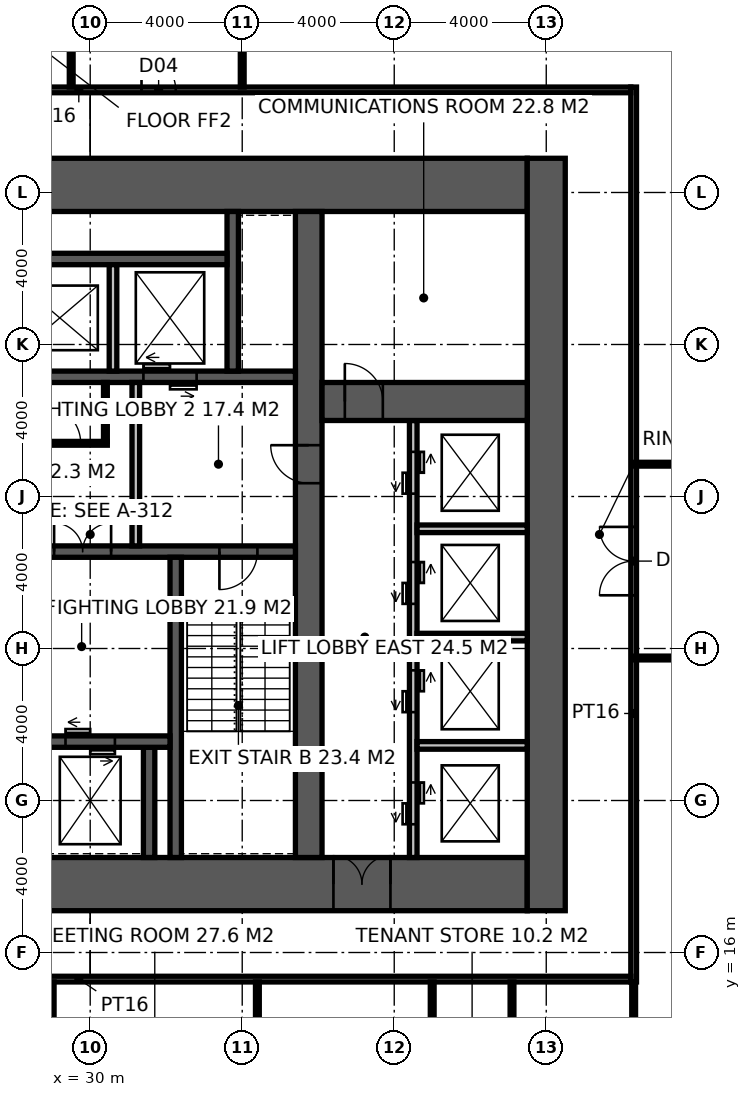
"""IFC4 building model, lengths in metres.
Left out: names, types, materials, properties, quantities, classifications, styles, units other than length and angle.
Written with IfcOpenShell. Run it as: python <this file> out.ifc"""

import sys

from ifc_helpers import new_model, si_unit, direction, frame, frame_2d, origin, place, context, subcontext, project, spatial, rectangle, extrude, element, fill, save


model = new_model("IFC4")
c1 = context("Model", 3, precision=1e-05, world=origin(), true_north=direction((0.0, 1.0)))
c2 = subcontext(c1, "Body", "Model", "MODEL_VIEW")
j1 = project(units=[si_unit("LENGTHUNIT", "METRE"), si_unit("PLANEANGLEUNIT", "RADIAN")], contexts=[c1])
p1 = place(None, origin())
s1 = spatial("IfcSite", under=j1, at=p1, CompositionType="ELEMENT")
p2 = place(p1, origin())
s2 = spatial("IfcBuilding", under=s1, at=p2, CompositionType="ELEMENT")
p3 = place(p2, frame((0.0, 0.0, 27.0)))
s3 = spatial("IfcBuildingStorey", under=s2, at=p3, CompositionType="ELEMENT", Elevation=27.0)
p4 = place(p3, frame((18.5, 17.8, -0.15), z_axis=(0.0, 0.0, 1.0), x_axis=(1.0, 0.0, 0.0)))
e1 = element("IfcWall", 1, at=p4, inside=s3, PredefinedType="SHEAR", context=c2, shape_type="SweptSolid", body=[
    extrude(rectangle(XDim=23.0, YDim=1.4, at=frame_2d((11.5, 0.0))), origin(), (0.0, 0.0, 1.0), 4.0),
])
p5 = place(p4, frame((3.45, 0.0, 0.15)))
e2 = element("IfcOpeningElement", 2, at=p5, cuts=e1, PredefinedType="OPENING", context=c2, shape_type="SweptSolid", body=[
    extrude(rectangle(XDim=1.5, YDim=2.4, at=frame_2d((0.75, 1.2))), frame((0.0, 0.71, 0.0), z_axis=(0.0, -1.0, 0.0), x_axis=(1.0, 0.0, 0.0)), (0.0, 0.0, 1.0), 1.42),
])
p6 = place(p4, frame((17.9, 0.0, 0.15)))
e3 = element("IfcOpeningElement", 3, at=p6, cuts=e1, PredefinedType="OPENING", context=c2, shape_type="SweptSolid", body=[
    extrude(rectangle(XDim=1.5, YDim=2.4, at=frame_2d((0.75, 1.2))), frame((0.0, 0.71, 0.0), z_axis=(0.0, -1.0, 0.0), x_axis=(1.0, 0.0, 0.0)), (0.0, 0.0, 1.0), 1.42),
])
p7 = place(p4, frame((0.9, 0.0, 0.15)))
e4 = element("IfcOpeningElement", 4, at=p7, cuts=e1, PredefinedType="OPENING", context=c2, shape_type="SweptSolid", body=[
    extrude(rectangle(XDim=1.0, YDim=2.2, at=frame_2d((0.5, 1.1))), frame((0.0, 0.71, 0.0), z_axis=(0.0, -1.0, 0.0), x_axis=(1.0, 0.0, 0.0)), (0.0, 0.0, 1.0), 1.42),
])
p8 = place(p3, frame((18.5, 36.2, -0.15), z_axis=(0.0, 0.0, 1.0), x_axis=(1.0, 0.0, 0.0)))
e5 = element("IfcWall", 5, at=p8, inside=s3, PredefinedType="SHEAR", context=c2, shape_type="SweptSolid", body=[
    extrude(rectangle(XDim=23.0, YDim=1.4, at=frame_2d((11.5, 0.0))), origin(), (0.0, 0.0, 1.0), 4.0),
])
p9 = place(p3, frame((42.0, 17.1, -0.15), z_axis=(0.0, 0.0, 1.0), x_axis=(0.0, 1.0, 0.0)))
e6 = element("IfcWall", 6, at=p9, inside=s3, PredefinedType="SHEAR", context=c2, shape_type="SweptSolid", body=[
    extrude(rectangle(XDim=19.8, YDim=1.0, at=frame_2d((9.9, 0.0))), origin(), (0.0, 0.0, 1.0), 4.0),
])
p10 = place(p3, frame((35.75, 18.5, -0.15), z_axis=(0.0, 0.0, 1.0), x_axis=(0.0, 1.0, 0.0)))
e7 = element("IfcWall", 7, at=p10, inside=s3, PredefinedType="SHEAR", context=c2, shape_type="SweptSolid", body=[
    extrude(rectangle(XDim=17.0, YDim=0.7, at=frame_2d((8.5, 0.0))), origin(), (0.0, 0.0, 1.0), 4.0),
])
p11 = place(p10, frame((9.85, 0.0, 0.15)))
e8 = element("IfcOpeningElement", 8, at=p11, cuts=e7, PredefinedType="OPENING", context=c2, shape_type="SweptSolid", body=[
    extrude(rectangle(XDim=1.0, YDim=2.2, at=frame_2d((0.5, 1.1))), frame((0.0, 0.36, 0.0), z_axis=(0.0, -1.0, 0.0), x_axis=(1.0, 0.0, 0.0)), (0.0, 0.0, 1.0), 0.72),
])
p12 = place(p3, frame((24.15, 26.55, -0.15), z_axis=(0.0, 0.0, 1.0), x_axis=(1.0, 0.0, 0.0)))
e9 = element("IfcWall", 9, at=p12, inside=s3, PredefinedType="SHEAR", context=c2, shape_type="SweptSolid", body=[
    extrude(rectangle(XDim=11.25, YDim=0.3, at=frame_2d((5.625, 0.0))), origin(), (0.0, 0.0, 1.0), 4.0),
])
p13 = place(p12, frame((9.25, 0.0, 0.15)))
e10 = element("IfcOpeningElement", 10, at=p13, cuts=e9, PredefinedType="OPENING", context=c2, shape_type="SweptSolid", body=[
    extrude(rectangle(XDim=1.0, YDim=2.2, at=frame_2d((0.5, 1.1))), frame((0.0, 0.16, 0.0), z_axis=(0.0, -1.0, 0.0), x_axis=(1.0, 0.0, 0.0)), (0.0, 0.0, 1.0), 0.32),
])
p14 = place(p12, frame((4.9, 0.0, 0.15)))
e11 = element("IfcOpeningElement", 11, at=p14, cuts=e9, PredefinedType="OPENING", context=c2, shape_type="SweptSolid", body=[
    extrude(rectangle(XDim=1.5, YDim=2.4, at=frame_2d((0.75, 1.2))), frame((0.0, 0.16, 0.0), z_axis=(0.0, -1.0, 0.0), x_axis=(1.0, 0.0, 0.0)), (0.0, 0.0, 1.0), 0.32),
])
p15 = place(p3, frame((32.25, 18.5, -0.15), z_axis=(0.0, 0.0, 1.0), x_axis=(0.0, 1.0, 0.0)))
e12 = element("IfcWall", 12, at=p15, inside=s3, PredefinedType="SHEAR", context=c2, shape_type="SweptSolid", body=[
    extrude(rectangle(XDim=7.9, YDim=0.3, at=frame_2d((3.95, 0.0))), origin(), (0.0, 0.0, 1.0), 4.0),
])
p16 = place(p3, frame((31.55, 18.5, -0.15), z_axis=(0.0, 0.0, 1.0), x_axis=(0.0, 1.0, 0.0)))
e13 = element("IfcWall", 13, at=p16, inside=s3, PredefinedType="SHEAR", context=c2, shape_type="SweptSolid", body=[
    extrude(rectangle(XDim=2.9, YDim=0.3, at=frame_2d((1.45, 0.0))), origin(), (0.0, 0.0, 1.0), 4.0),
])
p17 = place(p3, frame((28.3, 21.55, -0.15), z_axis=(0.0, 0.0, 1.0), x_axis=(1.0, 0.0, 0.0)))
e14 = element("IfcWall", 14, at=p17, inside=s3, PredefinedType="SHEAR", context=c2, shape_type="SweptSolid", body=[
    extrude(rectangle(XDim=3.8, YDim=0.3, at=frame_2d((1.9, 0.0))), origin(), (0.0, 0.0, 1.0), 4.0),
])
p18 = place(p17, frame((1.05, 0.0, 0.15)))
e15 = element("IfcOpeningElement", 15, at=p18, cuts=e14, PredefinedType="OPENING", context=c2, shape_type="SweptSolid", body=[
    extrude(rectangle(XDim=1.3, YDim=2.4, at=frame_2d((0.65, 1.2))), frame((0.0, 0.16, 0.0), z_axis=(0.0, -1.0, 0.0), x_axis=(1.0, 0.0, 0.0)), (0.0, 0.0, 1.0), 0.32),
])
p19 = place(p3, frame((24.15, 31.15, -0.15), z_axis=(0.0, 0.0, 1.0), x_axis=(1.0, 0.0, 0.0)))
e16 = element("IfcWall", 16, at=p19, inside=s3, PredefinedType="SHEAR", context=c2, shape_type="SweptSolid", body=[
    extrude(rectangle(XDim=11.25, YDim=0.3, at=frame_2d((5.625, 0.0))), origin(), (0.0, 0.0, 1.0), 4.0),
])
p20 = place(p19, frame((7.25, 0.0, 0.15)))
e17 = element("IfcOpeningElement", 17, at=p20, cuts=e16, PredefinedType="OPENING", context=c2, shape_type="SweptSolid", body=[
    extrude(rectangle(XDim=1.4, YDim=2.4, at=frame_2d((0.7, 1.2))), frame((0.0, 0.16, 0.0), z_axis=(0.0, -1.0, 0.0), x_axis=(1.0, 0.0, 0.0)), (0.0, 0.0, 1.0), 0.32),
])
p21 = place(p3, frame((33.75, 31.3, -0.15), z_axis=(0.0, 0.0, 1.0), x_axis=(0.0, 1.0, 0.0)))
e18 = element("IfcWall", 18, at=p21, inside=s3, PredefinedType="SHEAR", context=c2, shape_type="SweptSolid", body=[
    extrude(rectangle(XDim=4.2, YDim=0.3, at=frame_2d((2.1, 0.0))), origin(), (0.0, 0.0, 1.0), 4.0),
])
p22 = place(p3, frame((25.0, 34.25, -0.15), z_axis=(0.0, 0.0, 1.0), x_axis=(1.0, 0.0, 0.0)))
e19 = element("IfcWall", 19, at=p22, inside=s3, PredefinedType="SHEAR", context=c2, shape_type="SweptSolid", body=[
    extrude(rectangle(XDim=8.6, YDim=0.3, at=frame_2d((4.3, 0.0))), origin(), (0.0, 0.0, 1.0), 4.0),
])
p23 = place(p3, frame((30.6, 31.3, -0.15), z_axis=(0.0, 0.0, 1.0), x_axis=(0.0, 1.0, 0.0)))
e20 = element("IfcWall", 20, at=p23, inside=s3, PredefinedType="SOLIDWALL", context=c2, shape_type="SweptSolid", body=[
    extrude(rectangle(XDim=2.8, YDim=0.2, at=frame_2d((1.4, 0.0))), origin(), (0.0, 0.0, 1.0), 4.0),
])
p24 = place(p3, frame((38.5, 18.5, -0.15), z_axis=(0.0, 0.0, 1.0), x_axis=(0.0, 1.0, 0.0)))
e21 = element("IfcWall", 21, at=p24, inside=s3, PredefinedType="SOLIDWALL", context=c2, shape_type="SweptSolid", body=[
    extrude(rectangle(XDim=11.5, YDim=0.2, at=frame_2d((5.75, 0.0))), origin(), (0.0, 0.0, 1.0), 4.0),
])
p25 = place(p24, frame((0.875, 0.0, 0.15)))
e22 = element("IfcOpeningElement", 22, at=p25, cuts=e21, PredefinedType="OPENING", context=c2, shape_type="SweptSolid", body=[
    extrude(rectangle(XDim=1.1, YDim=2.2, at=frame_2d((0.55, 1.1))), frame((0.0, 0.11, 0.0), z_axis=(0.0, -1.0, 0.0), x_axis=(1.0, 0.0, 0.0)), (0.0, 0.0, 1.0), 0.22),
])
p26 = place(p24, frame((3.825, 0.0, 0.15)))
e23 = element("IfcOpeningElement", 23, at=p26, cuts=e21, PredefinedType="OPENING", context=c2, shape_type="SweptSolid", body=[
    extrude(rectangle(XDim=1.1, YDim=2.2, at=frame_2d((0.55, 1.1))), frame((0.0, 0.11, 0.0), z_axis=(0.0, -1.0, 0.0), x_axis=(1.0, 0.0, 0.0)), (0.0, 0.0, 1.0), 0.22),
])
p27 = place(p24, frame((6.675, 0.0, 0.15)))
e24 = element("IfcOpeningElement", 24, at=p27, cuts=e21, PredefinedType="OPENING", context=c2, shape_type="SweptSolid", body=[
    extrude(rectangle(XDim=1.1, YDim=2.2, at=frame_2d((0.55, 1.1))), frame((0.0, 0.11, 0.0), z_axis=(0.0, -1.0, 0.0), x_axis=(1.0, 0.0, 0.0)), (0.0, 0.0, 1.0), 0.22),
])
p28 = place(p24, frame((9.575, 0.0, 0.15)))
e25 = element("IfcOpeningElement", 25, at=p28, cuts=e21, PredefinedType="OPENING", context=c2, shape_type="SweptSolid", body=[
    extrude(rectangle(XDim=1.1, YDim=2.2, at=frame_2d((0.55, 1.1))), frame((0.0, 0.11, 0.0), z_axis=(0.0, -1.0, 0.0), x_axis=(1.0, 0.0, 0.0)), (0.0, 0.0, 1.0), 0.22),
])
p29 = place(p3, frame((36.1, 30.5, -0.15), z_axis=(0.0, 0.0, 1.0), x_axis=(1.0, 0.0, 0.0)))
e26 = element("IfcWall", 26, at=p29, inside=s3, PredefinedType="SHEAR", context=c2, shape_type="SweptSolid", body=[
    extrude(rectangle(XDim=5.4, YDim=1.0, at=frame_2d((2.7, 0.0))), origin(), (0.0, 0.0, 1.0), 4.0),
])
p30 = place(p29, frame((0.6, 0.0, 0.15)))
e27 = element("IfcOpeningElement", 27, at=p30, cuts=e26, PredefinedType="OPENING", context=c2, shape_type="SweptSolid", body=[
    extrude(rectangle(XDim=1.0, YDim=2.2, at=frame_2d((0.5, 1.1))), frame((0.0, 0.51, 0.0), z_axis=(0.0, -1.0, 0.0), x_axis=(1.0, 0.0, 0.0)), (0.0, 0.0, 1.0), 1.02),
])
for number, where, z_axis, x_axis in (
    (28, (38.6, 21.45, -0.15), (0.0, 0.0, 1.0), (1.0, 0.0, 0.0)),
    (29, (38.6, 24.3, -0.15), (0.0, 0.0, 1.0), (1.0, 0.0, 0.0)),
    (30, (38.6, 27.15, -0.15), (0.0, 0.0, 1.0), (1.0, 0.0, 0.0)),
):
    element("IfcWall", number, at=place(p3, frame(where, z_axis=z_axis, x_axis=x_axis)), inside=s3, PredefinedType="SOLIDWALL", context=c2, shape_type="SweptSolid", body=[
        extrude(rectangle(XDim=2.9, YDim=0.2, at=frame_2d((1.45, 0.0))), origin(), (0.0, 0.0, 1.0), 4.0),
    ])
p31 = place(p3, frame((31.2, 26.7, 0.0), z_axis=(0.0, 0.0, 1.0), x_axis=(0.0, 1.0, 0.0)))
e31 = element("IfcWall", 31, at=p31, inside=s3, PredefinedType="SOLIDWALL", context=c2, shape_type="SweptSolid", body=[
    extrude(rectangle(XDim=4.3, YDim=0.2, at=frame_2d((2.15, 0.0))), origin(), (0.0, 0.0, 1.0), 3.85),
])
p32 = place(p3, frame((25.75, 29.4, 0.0), z_axis=(0.0, 0.0, 1.0), x_axis=(1.0, 0.0, 0.0)))
e32 = element("IfcWall", 32, at=p32, inside=s3, PredefinedType="PARTITIONING", context=c2, shape_type="SweptSolid", body=[
    extrude(rectangle(XDim=4.7, YDim=0.1, at=frame_2d((2.35, 0.0))), origin(), (0.0, 0.0, 1.0), 3.85),
])
p33 = place(p32, frame((0.7, 0.0, 0.0)))
e33 = element("IfcOpeningElement", 33, at=p33, cuts=e32, PredefinedType="OPENING", context=c2, shape_type="SweptSolid", body=[
    extrude(rectangle(XDim=1.0, YDim=2.2, at=frame_2d((0.5, 1.1))), frame((0.0, 0.06, 0.0), z_axis=(0.0, -1.0, 0.0), x_axis=(1.0, 0.0, 0.0)), (0.0, 0.0, 1.0), 0.12),
])
p34 = place(p32, frame((3.0, 0.0, 0.0)))
e34 = element("IfcOpeningElement", 34, at=p34, cuts=e32, PredefinedType="OPENING", context=c2, shape_type="SweptSolid", body=[
    extrude(rectangle(XDim=1.0, YDim=2.2, at=frame_2d((0.5, 1.1))), frame((0.0, 0.06, 0.0), z_axis=(0.0, -1.0, 0.0), x_axis=(1.0, 0.0, 0.0)), (0.0, 0.0, 1.0), 0.12),
])
p35 = place(p3, frame((30.4, 29.45, 0.0), z_axis=(0.0, 0.0, 1.0), x_axis=(0.0, 1.0, 0.0)))
e35 = element("IfcWall", 35, at=p35, inside=s3, PredefinedType="PARTITIONING", context=c2, shape_type="SweptSolid", body=[
    extrude(rectangle(XDim=1.55, YDim=0.1, at=frame_2d((0.775, 0.0))), origin(), (0.0, 0.0, 1.0), 3.85),
])
p36 = place(p3, frame((44.3, 15.225, 0.0), z_axis=(0.0, 0.0, 1.0), x_axis=(0.0, 1.0, 0.0)))
e36 = element("IfcWall", 36, at=p36, inside=s3, PredefinedType="PARTITIONING", context=c2, shape_type="SweptSolid", body=[
    extrude(rectangle(XDim=23.55, YDim=0.15, at=frame_2d((11.775, 0.0))), origin(), (0.0, 0.0, 1.0), 3.85),
])
p37 = place(p36, frame((10.175, 0.0, 0.0)))
e37 = element("IfcOpeningElement", 37, at=p37, cuts=e36, PredefinedType="OPENING", context=c2, shape_type="SweptSolid", body=[
    extrude(rectangle(XDim=1.8, YDim=2.4, at=frame_2d((0.9, 1.2))), frame((0.0, 0.085, 0.0), z_axis=(0.0, -1.0, 0.0), x_axis=(1.0, 0.0, 0.0)), (0.0, 0.0, 1.0), 0.17),
])
p38 = place(p3, frame((15.175, 15.3, 0.0), z_axis=(0.0, 0.0, 1.0), x_axis=(1.0, 0.0, 0.0)))
e38 = element("IfcWall", 38, at=p38, inside=s3, PredefinedType="PARTITIONING", context=c2, shape_type="SweptSolid", body=[
    extrude(rectangle(XDim=29.05, YDim=0.15, at=frame_2d((14.525, 0.0))), origin(), (0.0, 0.0, 1.0), 3.85),
])
p39 = place(p3, frame((15.175, 38.7, 0.0), z_axis=(0.0, 0.0, 1.0), x_axis=(1.0, 0.0, 0.0)))
e39 = element("IfcWall", 39, at=p39, inside=s3, PredefinedType="PARTITIONING", context=c2, shape_type="SweptSolid", body=[
    extrude(rectangle(XDim=29.05, YDim=0.15, at=frame_2d((14.525, 0.0))), origin(), (0.0, 0.0, 1.0), 3.85),
])
p40 = place(p39, frame((8.575, 0.0, 0.0)))
e40 = element("IfcOpeningElement", 40, at=p40, cuts=e39, PredefinedType="OPENING", context=c2, shape_type="SweptSolid", body=[
    extrude(rectangle(XDim=0.9, YDim=2.1, at=frame_2d((0.45, 1.05))), frame((0.0, 0.085, 0.0), z_axis=(0.0, -1.0, 0.0), x_axis=(1.0, 0.0, 0.0)), (0.0, 0.0, 1.0), 0.17),
])
p41 = place(p39, frame((12.325, 0.0, 0.0)))
e41 = element("IfcOpeningElement", 41, at=p41, cuts=e39, PredefinedType="OPENING", context=c2, shape_type="SweptSolid", body=[
    extrude(rectangle(XDim=1.0, YDim=2.1, at=frame_2d((0.5, 1.05))), frame((0.0, 0.085, 0.0), z_axis=(0.0, -1.0, 0.0), x_axis=(1.0, 0.0, 0.0)), (0.0, 0.0, 1.0), 0.17),
])
p42 = place(p39, frame((16.175, 0.0, 0.0)))
e42 = element("IfcOpeningElement", 42, at=p42, cuts=e39, PredefinedType="OPENING", context=c2, shape_type="SweptSolid", body=[
    extrude(rectangle(XDim=0.9, YDim=2.1, at=frame_2d((0.45, 1.05))), frame((0.0, 0.085, 0.0), z_axis=(0.0, -1.0, 0.0), x_axis=(1.0, 0.0, 0.0)), (0.0, 0.0, 1.0), 0.17),
])
p43 = place(p3, frame((34.0, 38.775, 0.0), z_axis=(0.0, 0.0, 1.0), x_axis=(0.0, 1.0, 0.0)))
e43 = element("IfcWall", 43, at=p43, inside=s3, PredefinedType="PARTITIONING", context=c2, shape_type="SweptSolid", body=[
    extrude(rectangle(XDim=3.275, YDim=0.1, at=frame_2d((1.638, 0.0))), origin(), (0.0, 0.0, 1.0), 2.95),
])
p44 = place(p3, frame((29.5, 38.775, 0.0), z_axis=(0.0, 0.0, 1.0), x_axis=(0.0, 1.0, 0.0)))
e44 = element("IfcWall", 44, at=p44, inside=s3, PredefinedType="PARTITIONING", context=c2, shape_type="SweptSolid", body=[
    extrude(rectangle(XDim=3.175, YDim=0.1, at=frame_2d((1.587, 0.0))), origin(), (0.0, 0.0, 1.0), 3.85),
])
for number, where, z_axis, x_axis in (
    (45, (28.999, 9.95, 0.0), (0.0, 0.0, 1.0), (0.0, 1.0, 0.0)),
    (46, (34.399, 9.95, 0.0), (0.0, 0.0, 1.0), (0.0, 1.0, 0.0)),
    (47, (38.999, 9.95, 0.0), (0.0, 0.0, 1.0), (0.0, 1.0, 0.0)),
    (48, (41.099, 9.95, 0.0), (0.0, 0.0, 1.0), (0.0, 1.0, 0.0)),
    (49, (44.3, 9.95, 0.0), (0.0, 0.0, 1.0), (0.0, 1.0, 0.0)),
):
    element("IfcWall", number, at=place(p3, frame(where, z_axis=z_axis, x_axis=x_axis)), inside=s3, PredefinedType="PARTITIONING", context=c2, shape_type="SweptSolid", body=[
        extrude(rectangle(XDim=5.275, YDim=0.1, at=frame_2d((2.638, 0.0))), origin(), (0.0, 0.0, 1.0), 3.85),
    ])
for number, where, z_axis, x_axis in (
    (50, (44.3, 23.75, 0.0), (0.0, 0.0, 1.0), (1.0, 0.0, 0.0)),
    (51, (48.8, 28.85, 0.0), (0.0, 0.0, 1.0), (-1.0, 0.0, 0.0)),
):
    element("IfcWall", number, at=place(p3, frame(where, z_axis=z_axis, x_axis=x_axis)), inside=s3, PredefinedType="PARTITIONING", context=c2, shape_type="SweptSolid", body=[
        extrude(rectangle(XDim=4.5, YDim=0.1, at=frame_2d((2.25, 0.0))), origin(), (0.0, 0.0, 1.0), 3.85),
    ])
p45 = place(p13, frame((1.0, 0.0, 0.0), z_axis=(0.0, 0.0, 1.0), x_axis=(-1.0, 0.0, 0.0)))
e52 = element("IfcDoor", 52, at=p45, inside=s3, OperationType="SINGLE_SWING_RIGHT", PredefinedType="DOOR", context=c2, shape_type="SweptSolid", body=[
    extrude(rectangle(XDim=1.0, YDim=2.2, at=frame_2d((0.5, 1.1))), frame((0.0, 0.025, 0.0), z_axis=(0.0, -1.0, 0.0), x_axis=(1.0, 0.0, 0.0)), (0.0, 0.0, 1.0), 0.05),
])
fill(e10, e52)
p46 = place(p11, origin())
e53 = element("IfcDoor", 53, at=p46, inside=s3, OperationType="SINGLE_SWING_RIGHT", PredefinedType="DOOR", context=c2, shape_type="SweptSolid", body=[
    extrude(rectangle(XDim=1.0, YDim=2.2, at=frame_2d((0.5, 1.1))), frame((0.0, 0.025, 0.0), z_axis=(0.0, -1.0, 0.0), x_axis=(1.0, 0.0, 0.0)), (0.0, 0.0, 1.0), 0.05),
])
fill(e8, e53)
p47 = place(p14, origin())
e54 = element("IfcDoor", 54, at=p47, inside=s3, OperationType="DOUBLE_DOOR_DOUBLE_SWING", PredefinedType="DOOR", context=c2, shape_type="SweptSolid", body=[
    extrude(rectangle(XDim=1.5, YDim=2.4, at=frame_2d((0.75, 1.2))), frame((0.0, 0.025, 0.0), z_axis=(0.0, -1.0, 0.0), x_axis=(1.0, 0.0, 0.0)), (0.0, 0.0, 1.0), 0.05),
])
fill(e11, e54)
p48 = place(p34, origin())
e55 = element("IfcDoor", 55, at=p48, inside=s3, OperationType="SINGLE_SWING_LEFT", PredefinedType="DOOR", context=c2, shape_type="SweptSolid", body=[
    extrude(rectangle(XDim=1.0, YDim=2.2, at=frame_2d((0.5, 1.1))), frame((0.0, 0.025, 0.0), z_axis=(0.0, -1.0, 0.0), x_axis=(1.0, 0.0, 0.0)), (0.0, 0.0, 1.0), 0.05),
])
fill(e34, e55)
p49 = place(p6, origin())
e56 = element("IfcDoor", 56, at=p49, inside=s3, OperationType="DOUBLE_DOOR_DOUBLE_SWING", PredefinedType="DOOR", context=c2, shape_type="SweptSolid", body=[
    extrude(rectangle(XDim=1.5, YDim=2.4, at=frame_2d((0.75, 1.2))), frame((0.0, 0.025, 0.0), z_axis=(0.0, -1.0, 0.0), x_axis=(1.0, 0.0, 0.0)), (0.0, 0.0, 1.0), 0.05),
])
fill(e3, e56)
p50 = place(p30, origin())
e57 = element("IfcDoor", 57, at=p50, inside=s3, OperationType="SINGLE_SWING_LEFT", PredefinedType="DOOR", context=c2, shape_type="SweptSolid", body=[
    extrude(rectangle(XDim=1.0, YDim=2.2, at=frame_2d((0.5, 1.1))), frame((0.0, 0.025, 0.0), z_axis=(0.0, -1.0, 0.0), x_axis=(1.0, 0.0, 0.0)), (0.0, 0.0, 1.0), 0.05),
])
fill(e27, e57)
p51 = place(p42, origin())
e58 = element("IfcDoor", 58, at=p51, inside=s3, OperationType="SINGLE_SWING_LEFT", PredefinedType="DOOR", context=c2, shape_type="SweptSolid", body=[
    extrude(rectangle(XDim=0.9, YDim=2.1, at=frame_2d((0.45, 1.05))), frame((0.0, 0.025, 0.0), z_axis=(0.0, -1.0, 0.0), x_axis=(1.0, 0.0, 0.0)), (0.0, 0.0, 1.0), 0.05),
])
fill(e42, e58)
p52 = place(p37, origin())
e59 = element("IfcDoor", 59, at=p52, inside=s3, OperationType="DOUBLE_DOOR_DOUBLE_SWING", PredefinedType="DOOR", context=c2, shape_type="SweptSolid", body=[
    extrude(rectangle(XDim=1.8, YDim=2.4, at=frame_2d((0.9, 1.2))), frame((0.0, 0.025, 0.0), z_axis=(0.0, -1.0, 0.0), x_axis=(1.0, 0.0, 0.0)), (0.0, 0.0, 1.0), 0.05),
])
fill(e37, e59)
p53 = place(p18, origin())
e60 = element("IfcDoor", 60, at=p53, inside=s3, OperationType="DOUBLE_DOOR_SLIDING", PredefinedType="DOOR", context=c2, shape_type="SweptSolid", body=[
    extrude(rectangle(XDim=1.3, YDim=2.4, at=frame_2d((0.65, 1.2))), frame((0.0, 0.025, 0.0), z_axis=(0.0, -1.0, 0.0), x_axis=(1.0, 0.0, 0.0)), (0.0, 0.0, 1.0), 0.05),
])
fill(e15, e60)
p54 = place(p20, origin())
e61 = element("IfcDoor", 61, at=p54, inside=s3, OperationType="DOUBLE_DOOR_SLIDING", PredefinedType="DOOR", context=c2, shape_type="SweptSolid", body=[
    extrude(rectangle(XDim=1.4, YDim=2.4, at=frame_2d((0.7, 1.2))), frame((0.0, 0.025, 0.0), z_axis=(0.0, -1.0, 0.0), x_axis=(1.0, 0.0, 0.0)), (0.0, 0.0, 1.0), 0.05),
])
fill(e17, e61)
p55 = place(p25, origin())
e62 = element("IfcDoor", 62, at=p55, inside=s3, OperationType="DOUBLE_DOOR_SLIDING", PredefinedType="DOOR", context=c2, shape_type="SweptSolid", body=[
    extrude(rectangle(XDim=1.1, YDim=2.2, at=frame_2d((0.55, 1.1))), frame((0.0, 0.025, 0.0), z_axis=(0.0, -1.0, 0.0), x_axis=(1.0, 0.0, 0.0)), (0.0, 0.0, 1.0), 0.05),
])
fill(e22, e62)
p56 = place(p26, origin())
e63 = element("IfcDoor", 63, at=p56, inside=s3, OperationType="DOUBLE_DOOR_SLIDING", PredefinedType="DOOR", context=c2, shape_type="SweptSolid", body=[
    extrude(rectangle(XDim=1.1, YDim=2.2, at=frame_2d((0.55, 1.1))), frame((0.0, 0.025, 0.0), z_axis=(0.0, -1.0, 0.0), x_axis=(1.0, 0.0, 0.0)), (0.0, 0.0, 1.0), 0.05),
])
fill(e23, e63)
p57 = place(p27, origin())
e64 = element("IfcDoor", 64, at=p57, inside=s3, OperationType="DOUBLE_DOOR_SLIDING", PredefinedType="DOOR", context=c2, shape_type="SweptSolid", body=[
    extrude(rectangle(XDim=1.1, YDim=2.2, at=frame_2d((0.55, 1.1))), frame((0.0, 0.025, 0.0), z_axis=(0.0, -1.0, 0.0), x_axis=(1.0, 0.0, 0.0)), (0.0, 0.0, 1.0), 0.05),
])
fill(e24, e64)
p58 = place(p28, origin())
e65 = element("IfcDoor", 65, at=p58, inside=s3, OperationType="DOUBLE_DOOR_SLIDING", PredefinedType="DOOR", context=c2, shape_type="SweptSolid", body=[
    extrude(rectangle(XDim=1.1, YDim=2.2, at=frame_2d((0.55, 1.1))), frame((0.0, 0.025, 0.0), z_axis=(0.0, -1.0, 0.0), x_axis=(1.0, 0.0, 0.0)), (0.0, 0.0, 1.0), 0.05),
])
fill(e25, e65)
save(model, sys.argv[1])
